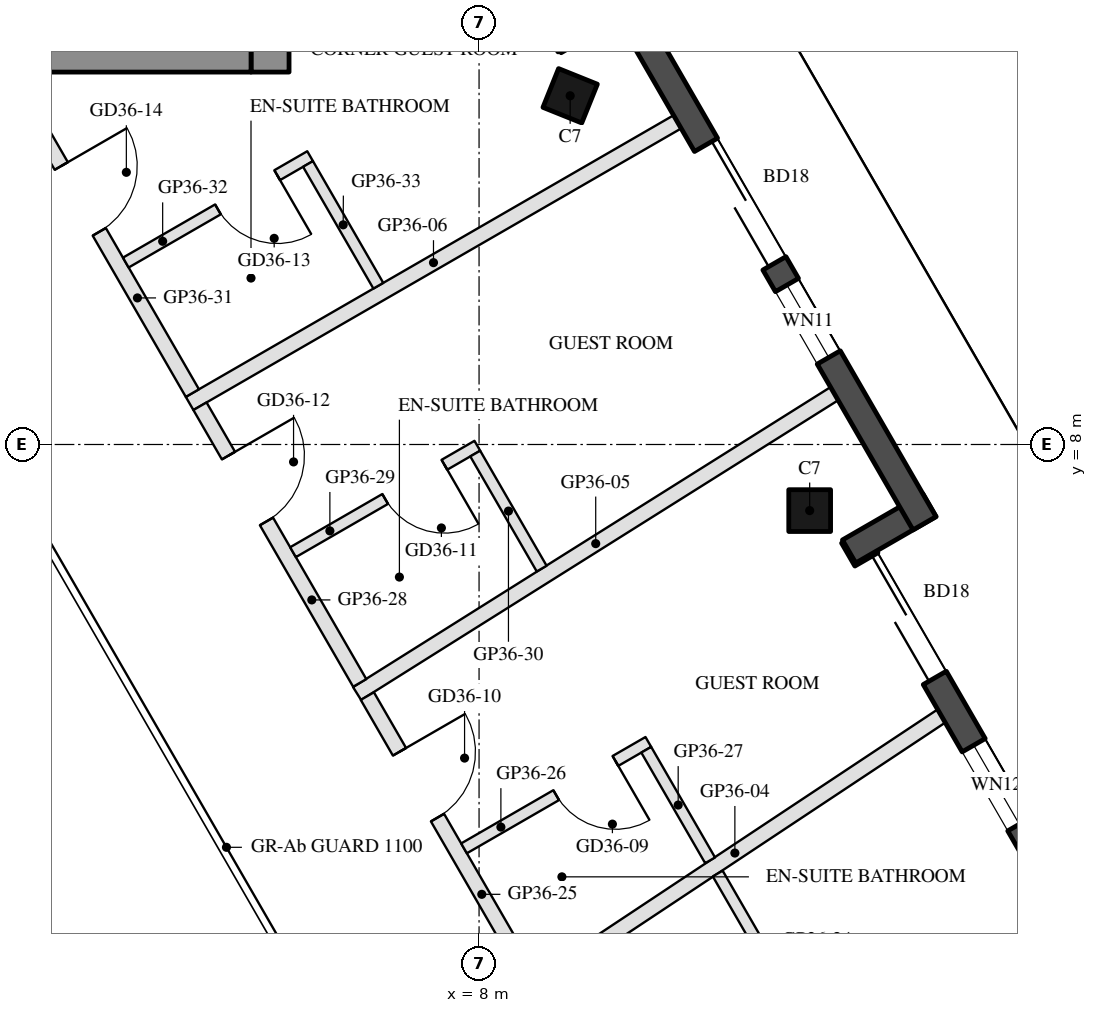
"""IFC4 building model, lengths in metres.
Left out: names, types, materials, properties, quantities, classifications, styles, units other than length and angle.
Written with IfcOpenShell. Run it as: python <this file> out.ifc"""

import sys

from ifc_helpers import new_model, si_unit, direction, frame, frame_2d, origin, origin_2d, place, context, subcontext, project, spatial, rectangle, hollow_rectangle, extrude, boolean, halfspace, element, fill, save


model = new_model("IFC4")
c1 = context("Model", 3, precision=1e-05, world=origin(), true_north=direction((0.0, 1.0)))
c2 = subcontext(c1, "Body", "Model", "MODEL_VIEW")
j1 = project(units=[si_unit("LENGTHUNIT", "METRE"), si_unit("PLANEANGLEUNIT", "RADIAN")], contexts=[c1])
p1 = place(None, origin())
s1 = spatial("IfcSite", under=j1, at=p1, CompositionType="ELEMENT")
p2 = place(p1, origin())
s2 = spatial("IfcBuilding", under=s1, at=p2, CompositionType="ELEMENT")
p3 = place(p2, frame((0.0, 0.0, 328.1)))
s3 = spatial("IfcBuildingStorey", under=s2, at=p3, CompositionType="ELEMENT", Elevation=328.1)
p4 = place(p3, frame((15.501, 1.672, 0.0), z_axis=(-0.161451925123, -0.022915757114, 0.986614485982), x_axis=(0.495072298274, -0.866715969634, 0.060883885081)))
e1 = element("IfcColumn", 1, at=p4, inside=s3, PredefinedType="COLUMN", context=c2, shape_type="SweptSolid", body=[
    boolean("DIFFERENCE", boolean("DIFFERENCE", extrude(hollow_rectangle(XDim=0.55, YDim=0.55, WallThickness=0.025, at=origin_2d()), origin(), (0.0, 0.0, 1.0), 3.75), halfspace(frame((0.0, 0.0, 0.034), z_axis=(0.0, 0.0, 1.0), x_axis=(1.0, 0.0, 0.0)), True)), halfspace(frame((0.0, 0.0, 3.735), z_axis=(0.0, 0.0, 1.0), x_axis=(1.0, 0.0, 0.0)), False)),
])
p5 = place(p3, frame((12.35, 7.13, 0.0), z_axis=(-0.131228839908, -0.075723997581, 0.988455799602), x_axis=(-0.499707328911, 0.866194311446, 1.5866039e-05)))
e2 = element("IfcColumn", 2, at=p5, inside=s3, PredefinedType="COLUMN", context=c2, shape_type="SweptSolid", body=[
    boolean("DIFFERENCE", boolean("DIFFERENCE", extrude(hollow_rectangle(XDim=0.55, YDim=0.55, WallThickness=0.025, at=origin_2d()), origin(), (0.0, 0.0, 1.0), 3.743), halfspace(frame((0.0, 0.0, 0.031), z_axis=(0.0, 0.0, 1.0), x_axis=(1.0, 0.0, 0.0)), True)), halfspace(frame((0.0, 0.0, 3.729), z_axis=(0.0, 0.0, 1.0), x_axis=(1.0, 0.0, 0.0)), False)),
])
p6 = place(p3, frame((9.198, 12.588, 0.0), z_axis=(-0.100518021011, -0.128316722417, 0.98662604172), x_axis=(-0.503129383785, 0.862065632243, 0.060857775822)))
e3 = element("IfcColumn", 3, at=p6, inside=s3, PredefinedType="COLUMN", context=c2, shape_type="SweptSolid", body=[
    boolean("DIFFERENCE", boolean("DIFFERENCE", extrude(hollow_rectangle(XDim=0.55, YDim=0.55, WallThickness=0.025, at=origin_2d()), origin(), (0.0, 0.0, 1.0), 3.75), halfspace(frame((0.0, 0.0, 0.034), z_axis=(0.0, 0.0, 1.0), x_axis=(1.0, 0.0, 0.0)), True)), halfspace(frame((0.0, 0.0, 3.735), z_axis=(0.0, 0.0, 1.0), x_axis=(1.0, 0.0, 0.0)), False)),
])
p7 = place(p3, frame((15.492, 2.337, 0.0), z_axis=(0.0, 0.0, 1.0), x_axis=(-0.499999159329, 0.866025889145, 0.0)))
e4 = element("IfcWall", 4, at=p7, inside=s3, PredefinedType="SOLIDWALL", context=c2, shape_type="SweptSolid", body=[
    extrude(rectangle(XDim=5.143, YDim=0.35, at=frame_2d((2.571, 0.0))), origin(), (0.0, 0.0, 1.0), 3.45),
])
p8 = place(p7, frame((0.77, 0.0, 0.3)))
e5 = element("IfcOpeningElement", 5, at=p8, cuts=e4, PredefinedType="OPENING", context=c2, shape_type="SweptSolid", body=[
    extrude(rectangle(XDim=1.2, YDim=2.65, at=frame_2d((0.6, 1.325))), frame((0.0, 0.185, 0.0), z_axis=(0.0, -1.0, 0.0), x_axis=(1.0, 0.0, 0.0)), (0.0, 0.0, 1.0), 0.37),
])
p9 = place(p7, frame((2.993, 0.0, 0.0)))
e6 = element("IfcOpeningElement", 6, at=p9, cuts=e4, PredefinedType="OPENING", context=c2, shape_type="SweptSolid", body=[
    extrude(rectangle(XDim=1.8, YDim=2.4, at=frame_2d((0.9, 1.2))), frame((0.0, 0.185, 0.0), z_axis=(0.0, -1.0, 0.0), x_axis=(1.0, 0.0, 0.0)), (0.0, 0.0, 1.0), 0.37),
])
p10 = place(p3, frame((12.868, 6.592, 0.0), z_axis=(0.0, 0.0, 1.0), x_axis=(0.866005645448, 0.500034220881, 0.0)))
e7 = element("IfcWall", 7, at=p10, inside=s3, PredefinedType="SOLIDWALL", context=c2, shape_type="SweptSolid", body=[
    extrude(rectangle(XDim=1.22, YDim=0.35, at=frame_2d((0.61, 0.0))), origin(), (0.0, 0.0, 1.0), 3.45),
])
p11 = place(p3, frame((13.861, 6.963, 0.0), z_axis=(0.0, 0.0, 1.0), x_axis=(-0.499985896038, 0.866033546558, 0.0)))
e8 = element("IfcWall", 8, at=p11, inside=s3, PredefinedType="SOLIDWALL", context=c2, shape_type="SweptSolid", body=[
    extrude(rectangle(XDim=8.102, YDim=0.35, at=frame_2d((4.051, 0.0))), origin(), (0.0, 0.0, 1.0), 3.45),
])
p12 = place(p11, frame((3.95, 0.0, 0.0)))
e9 = element("IfcOpeningElement", 9, at=p12, cuts=e8, PredefinedType="OPENING", context=c2, shape_type="SweptSolid", body=[
    extrude(rectangle(XDim=1.8, YDim=2.4, at=frame_2d((0.9, 1.2))), frame((0.0, 0.185, 0.0), z_axis=(0.0, -1.0, 0.0), x_axis=(1.0, 0.0, 0.0)), (0.0, 0.0, 1.0), 0.37),
])
p13 = place(p11, frame((2.52, 0.0, 0.3)))
e10 = element("IfcOpeningElement", 10, at=p13, cuts=e8, PredefinedType="OPENING", context=c2, shape_type="SweptSolid", body=[
    extrude(rectangle(XDim=1.1, YDim=2.65, at=frame_2d((0.55, 1.325))), frame((0.0, 0.185, 0.0), z_axis=(0.0, -1.0, 0.0), x_axis=(1.0, 0.0, 0.0)), (0.0, 0.0, 1.0), 0.37),
])
p14 = place(p3, frame((10.049, 13.916, 0.0), z_axis=(0.0, 0.0, 1.0), x_axis=(-0.866005645448, -0.500034220881, 0.0)))
e11 = element("IfcWall", 11, at=p14, inside=s3, PredefinedType="SOLIDWALL", context=c2, shape_type="SweptSolid", body=[
    extrude(rectangle(XDim=1.22, YDim=0.35, at=frame_2d((0.61, 0.0))), origin(), (0.0, 0.0, 1.0), 3.45),
])
p15 = place(p3, frame((5.25, 12.9, 0.0), z_axis=(0.0, 0.0, 1.0), x_axis=(0.0, 1.0, 0.0)))
e12 = element("IfcWall", 12, at=p15, inside=s3, PredefinedType="SHEAR", context=c2, shape_type="SweptSolid", body=[
    extrude(rectangle(XDim=4.085, YDim=0.5, at=frame_2d((2.042, 0.0))), origin(), (0.0, 0.0, 1.0), 3.45),
])
p16 = place(p3, frame((5.0, 13.1, 0.0), z_axis=(0.0, 0.0, 1.0), x_axis=(-1.0, 0.0, 0.0)))
e13 = element("IfcWall", 13, at=p16, inside=s3, PredefinedType="SHEAR", context=c2, shape_type="SweptSolid", body=[
    extrude(rectangle(XDim=10.0, YDim=0.4, at=frame_2d((5.0, 0.0))), origin(), (0.0, 0.0, 1.0), 3.45),
])
p17 = place(p16, frame((3.55, 0.0, 0.0)))
e14 = element("IfcOpeningElement", 14, at=p17, cuts=e13, PredefinedType="OPENING", context=c2, shape_type="SweptSolid", body=[
    extrude(rectangle(XDim=1.1, YDim=2.1, at=frame_2d((0.55, 1.05))), frame((0.0, 0.21, 0.0), z_axis=(0.0, -1.0, 0.0), x_axis=(1.0, 0.0, 0.0)), (0.0, 0.0, 1.0), 0.42),
])
p18 = place(p16, frame((5.85, 0.0, 0.0)))
e15 = element("IfcOpeningElement", 15, at=p18, cuts=e13, PredefinedType="OPENING", context=c2, shape_type="SweptSolid", body=[
    extrude(rectangle(XDim=1.4, YDim=2.1, at=frame_2d((0.7, 1.05))), frame((0.0, 0.21, 0.0), z_axis=(0.0, -1.0, 0.0), x_axis=(1.0, 0.0, 0.0)), (0.0, 0.0, 1.0), 0.42),
])
p19 = place(p3, frame((14.083, 4.427, 0.0), z_axis=(0.0, 0.0, 1.0), x_axis=(-0.833314888817, -0.55279860354, 0.0)))
e16 = element("IfcWall", 16, at=p19, inside=s3, PredefinedType="PARTITIONING", context=c2, shape_type="SweptSolid", body=[
    extrude(rectangle(XDim=6.523, YDim=0.2, at=frame_2d((3.262, 0.0))), origin(), (0.0, 0.0, 1.0), 2.75),
])
p20 = place(p3, frame((12.674, 8.668, 0.0), z_axis=(0.0, 0.0, 1.0), x_axis=(-0.846714096045, -0.532048155301, 0.0)))
e17 = element("IfcWall", 17, at=p20, inside=s3, PredefinedType="PARTITIONING", context=c2, shape_type="SweptSolid", body=[
    extrude(rectangle(XDim=7.416, YDim=0.2, at=frame_2d((3.708, 0.0))), origin(), (0.0, 0.0, 1.0), 3.05),
])
p21 = place(p3, frame((10.609, 12.245, 0.0), z_axis=(0.0, 0.0, 1.0), x_axis=(-0.866014407023, -0.500019046465, 0.0)))
e18 = element("IfcWall", 18, at=p21, inside=s3, PredefinedType="PARTITIONING", context=c2, shape_type="SweptSolid", body=[
    extrude(rectangle(XDim=7.41, YDim=0.2, at=frame_2d((3.705, 0.0))), origin(), (0.0, 0.0, 1.0), 3.05),
])
p22 = place(p3, frame((12.15, 0.606, 0.0), z_axis=(0.0, 0.0, 1.0), x_axis=(-0.500078207394, 0.865980246016, 0.0)))
e19 = element("IfcWall", 19, at=p22, inside=s3, PredefinedType="PARTITIONING", context=c2, shape_type="SweptSolid", body=[
    extrude(rectangle(XDim=2.02, YDim=0.15, at=frame_2d((1.01, 0.0))), origin(), (0.0, 0.0, 1.0), 3.45),
])
p23 = place(p3, frame((6.53, 4.689, 0.0), z_axis=(0.0, 0.0, 1.0), x_axis=(0.500002449018, -0.866023989838, 0.0)))
e20 = element("IfcWall", 20, at=p23, inside=s3, PredefinedType="PARTITIONING", context=c2, shape_type="SweptSolid", body=[
    extrude(rectangle(XDim=4.302, YDim=0.2, at=frame_2d((2.151, 0.0))), origin(), (0.0, 0.0, 1.0), 2.75),
])
p24 = place(p23, frame((0.846, 0.0, 0.0)))
e21 = element("IfcOpeningElement", 21, at=p24, cuts=e20, PredefinedType="OPENING", context=c2, shape_type="SweptSolid", body=[
    extrude(rectangle(XDim=1.0, YDim=2.1, at=frame_2d((0.5, 1.05))), frame((0.0, 0.11, 0.0), z_axis=(0.0, -1.0, 0.0), x_axis=(1.0, 0.0, 0.0)), (0.0, 0.0, 1.0), 0.22),
])
p25 = place(p3, frame((10.227, 4.086, 0.0), z_axis=(0.0, 0.0, 1.0), x_axis=(-0.866034573852, -0.49998411664, 0.0)))
e22 = element("IfcWall", 22, at=p25, inside=s3, PredefinedType="PARTITIONING", context=c2, shape_type="SweptSolid", body=[
    extrude(rectangle(XDim=2.8, YDim=0.15, at=frame_2d((1.4, 0.0))), origin(), (0.0, 0.0, 1.0), 3.45),
])
p26 = place(p25, frame((0.5, 0.0, 0.0)))
e23 = element("IfcOpeningElement", 23, at=p26, cuts=e22, PredefinedType="OPENING", context=c2, shape_type="SweptSolid", body=[
    extrude(rectangle(XDim=0.9, YDim=2.1, at=frame_2d((0.45, 1.05))), frame((0.0, 0.085, 0.0), z_axis=(0.0, -1.0, 0.0), x_axis=(1.0, 0.0, 0.0)), (0.0, 0.0, 1.0), 0.17),
])
p27 = place(p3, frame((11.04, 2.529, 0.0), z_axis=(0.0, 0.0, 1.0), x_axis=(-0.499999171277, 0.866025882247, 0.0)))
e24 = element("IfcWall", 24, at=p27, inside=s3, PredefinedType="PARTITIONING", context=c2, shape_type="SweptSolid", body=[
    extrude(rectangle(XDim=1.68, YDim=0.15, at=frame_2d((0.84, 0.0))), origin(), (0.0, 0.0, 1.0), 2.75),
])
p28 = place(p3, frame((4.328, 8.503, 0.0), z_axis=(0.0, 0.0, 1.0), x_axis=(0.499980520401, -0.866036650044, 0.0)))
e25 = element("IfcWall", 25, at=p28, inside=s3, PredefinedType="PARTITIONING", context=c2, shape_type="SweptSolid", body=[
    extrude(rectangle(XDim=4.204, YDim=0.2, at=frame_2d((2.102, 0.0))), origin(), (0.0, 0.0, 1.0), 2.75),
])
p29 = place(p28, frame((0.75, 0.0, 0.0)))
e26 = element("IfcOpeningElement", 26, at=p29, cuts=e25, PredefinedType="OPENING", context=c2, shape_type="SweptSolid", body=[
    extrude(rectangle(XDim=1.0, YDim=2.1, at=frame_2d((0.5, 1.05))), frame((0.0, 0.11, 0.0), z_axis=(0.0, -1.0, 0.0), x_axis=(1.0, 0.0, 0.0)), (0.0, 0.0, 1.0), 0.22),
])
p30 = place(p3, frame((7.977, 7.983, 0.0), z_axis=(0.0, 0.0, 1.0), x_axis=(-0.866034573852, -0.49998411664, 0.0)))
e27 = element("IfcWall", 27, at=p30, inside=s3, PredefinedType="PARTITIONING", context=c2, shape_type="SweptSolid", body=[
    extrude(rectangle(XDim=2.8, YDim=0.15, at=frame_2d((1.4, 0.0))), origin(), (0.0, 0.0, 1.0), 2.75),
])
p31 = place(p30, frame((0.5, 0.0, 0.0)))
e28 = element("IfcOpeningElement", 28, at=p31, cuts=e27, PredefinedType="OPENING", context=c2, shape_type="SweptSolid", body=[
    extrude(rectangle(XDim=0.9, YDim=2.1, at=frame_2d((0.45, 1.05))), frame((0.0, 0.085, 0.0), z_axis=(0.0, -1.0, 0.0), x_axis=(1.0, 0.0, 0.0)), (0.0, 0.0, 1.0), 0.17),
])
p32 = place(p3, frame((8.824, 6.367, 0.0), z_axis=(0.0, 0.0, 1.0), x_axis=(-0.500044870432, 0.865999496279, 0.0)))
e29 = element("IfcWall", 29, at=p32, inside=s3, PredefinedType="PARTITIONING", context=c2, shape_type="SweptSolid", body=[
    extrude(rectangle(XDim=1.748, YDim=0.15, at=frame_2d((0.874, 0.0))), origin(), (0.0, 0.0, 1.0), 3.45),
])
p33 = place(p3, frame((1.819, 12.85, 0.0), z_axis=(0.0, 0.0, 1.0), x_axis=(0.500007490527, -0.866021079084, 0.0)))
e30 = element("IfcWall", 30, at=p33, inside=s3, PredefinedType="PARTITIONING", context=c2, shape_type="SweptSolid", body=[
    extrude(rectangle(XDim=4.819, YDim=0.2, at=frame_2d((2.41, 0.0))), origin(), (0.0, 0.0, 1.0), 3.05),
])
p34 = place(p33, frame((1.369, 0.0, 0.0)))
e31 = element("IfcOpeningElement", 31, at=p34, cuts=e30, PredefinedType="OPENING", context=c2, shape_type="SweptSolid", body=[
    extrude(rectangle(XDim=1.0, YDim=2.1, at=frame_2d((0.5, 1.05))), frame((0.0, 0.11, 0.0), z_axis=(0.0, -1.0, 0.0), x_axis=(1.0, 0.0, 0.0)), (0.0, 0.0, 1.0), 0.22),
])
p35 = place(p3, frame((5.777, 11.794, 0.0), z_axis=(0.0, 0.0, 1.0), x_axis=(-0.865996816683, -0.500049511043, 0.0)))
e32 = element("IfcWall", 32, at=p35, inside=s3, PredefinedType="PARTITIONING", context=c2, shape_type="SweptSolid", body=[
    extrude(rectangle(XDim=2.8, YDim=0.15, at=frame_2d((1.4, 0.0))), origin(), (0.0, 0.0, 1.0), 3.45),
])
p36 = place(p35, frame((0.5, 0.0, 0.0)))
e33 = element("IfcOpeningElement", 33, at=p36, cuts=e32, PredefinedType="OPENING", context=c2, shape_type="SweptSolid", body=[
    extrude(rectangle(XDim=0.9, YDim=2.1, at=frame_2d((0.45, 1.05))), frame((0.0, 0.085, 0.0), z_axis=(0.0, -1.0, 0.0), x_axis=(1.0, 0.0, 0.0)), (0.0, 0.0, 1.0), 0.17),
])
p37 = place(p3, frame((6.675, 10.089, 0.0), z_axis=(0.0, 0.0, 1.0), x_axis=(-0.500042316284, 0.866000971088, 0.0)))
e34 = element("IfcWall", 34, at=p37, inside=s3, PredefinedType="PARTITIONING", context=c2, shape_type="SweptSolid", body=[
    extrude(rectangle(XDim=1.85, YDim=0.15, at=frame_2d((0.925, 0.0))), origin(), (0.0, 0.0, 1.0), 3.05),
])
p38 = place(p8, origin())
e35 = element("IfcWindow", 35, at=p38, inside=s3, PartitioningType="SINGLE_PANEL", PredefinedType="WINDOW", context=c2, shape_type="SweptSolid", body=[
    extrude(rectangle(XDim=1.2, YDim=2.65, at=frame_2d((0.6, 1.325))), frame((0.0, 0.03, 0.0), z_axis=(0.0, -1.0, 0.0), x_axis=(1.0, 0.0, 0.0)), (0.0, 0.0, 1.0), 0.06),
])
fill(e5, e35)
p39 = place(p9, frame((1.8, 0.0, 0.0), z_axis=(0.0, 0.0, 1.0), x_axis=(-1.0, 0.0, 0.0)))
e36 = element("IfcDoor", 36, at=p39, inside=s3, OperationType="SLIDING_TO_LEFT", PredefinedType="DOOR", context=c2, shape_type="SweptSolid", body=[
    extrude(rectangle(XDim=1.8, YDim=2.4, at=frame_2d((0.9, 1.2))), frame((0.0, 0.025, 0.0), z_axis=(0.0, -1.0, 0.0), x_axis=(1.0, 0.0, 0.0)), (0.0, 0.0, 1.0), 0.05),
])
fill(e6, e36)
p40 = place(p12, frame((1.8, 0.0, 0.0), z_axis=(0.0, 0.0, 1.0), x_axis=(-1.0, 0.0, 0.0)))
e37 = element("IfcDoor", 37, at=p40, inside=s3, OperationType="SLIDING_TO_LEFT", PredefinedType="DOOR", context=c2, shape_type="SweptSolid", body=[
    extrude(rectangle(XDim=1.8, YDim=2.4, at=frame_2d((0.9, 1.2))), frame((0.0, 0.025, 0.0), z_axis=(0.0, -1.0, 0.0), x_axis=(1.0, 0.0, 0.0)), (0.0, 0.0, 1.0), 0.05),
])
fill(e9, e37)
p41 = place(p13, origin())
e38 = element("IfcWindow", 38, at=p41, inside=s3, PartitioningType="SINGLE_PANEL", PredefinedType="WINDOW", context=c2, shape_type="SweptSolid", body=[
    extrude(rectangle(XDim=1.1, YDim=2.65, at=frame_2d((0.55, 1.325))), frame((0.0, 0.03, 0.0), z_axis=(0.0, -1.0, 0.0), x_axis=(1.0, 0.0, 0.0)), (0.0, 0.0, 1.0), 0.06),
])
fill(e10, e38)
p42 = place(p26, origin())
e39 = element("IfcDoor", 39, at=p42, inside=s3, OperationType="SINGLE_SWING_LEFT", PredefinedType="DOOR", context=c2, shape_type="SweptSolid", body=[
    extrude(rectangle(XDim=0.9, YDim=2.1, at=frame_2d((0.45, 1.05))), frame((0.0, 0.025, 0.0), z_axis=(0.0, -1.0, 0.0), x_axis=(1.0, 0.0, 0.0)), (0.0, 0.0, 1.0), 0.05),
])
fill(e23, e39)
p43 = place(p24, origin())
e40 = element("IfcDoor", 40, at=p43, inside=s3, OperationType="SINGLE_SWING_LEFT", PredefinedType="DOOR", context=c2, shape_type="SweptSolid", body=[
    extrude(rectangle(XDim=1.0, YDim=2.1, at=frame_2d((0.5, 1.05))), frame((0.0, 0.025, 0.0), z_axis=(0.0, -1.0, 0.0), x_axis=(1.0, 0.0, 0.0)), (0.0, 0.0, 1.0), 0.05),
])
fill(e21, e40)
p44 = place(p31, origin())
e41 = element("IfcDoor", 41, at=p44, inside=s3, OperationType="SINGLE_SWING_LEFT", PredefinedType="DOOR", context=c2, shape_type="SweptSolid", body=[
    extrude(rectangle(XDim=0.9, YDim=2.1, at=frame_2d((0.45, 1.05))), frame((0.0, 0.025, 0.0), z_axis=(0.0, -1.0, 0.0), x_axis=(1.0, 0.0, 0.0)), (0.0, 0.0, 1.0), 0.05),
])
fill(e28, e41)
p45 = place(p29, origin())
e42 = element("IfcDoor", 42, at=p45, inside=s3, OperationType="SINGLE_SWING_LEFT", PredefinedType="DOOR", context=c2, shape_type="SweptSolid", body=[
    extrude(rectangle(XDim=1.0, YDim=2.1, at=frame_2d((0.5, 1.05))), frame((0.0, 0.025, 0.0), z_axis=(0.0, -1.0, 0.0), x_axis=(1.0, 0.0, 0.0)), (0.0, 0.0, 1.0), 0.05),
])
fill(e26, e42)
p46 = place(p36, origin())
e43 = element("IfcDoor", 43, at=p46, inside=s3, OperationType="SINGLE_SWING_LEFT", PredefinedType="DOOR", context=c2, shape_type="SweptSolid", body=[
    extrude(rectangle(XDim=0.9, YDim=2.1, at=frame_2d((0.45, 1.05))), frame((0.0, 0.025, 0.0), z_axis=(0.0, -1.0, 0.0), x_axis=(1.0, 0.0, 0.0)), (0.0, 0.0, 1.0), 0.05),
])
fill(e33, e43)
p47 = place(p34, origin())
e44 = element("IfcDoor", 44, at=p47, inside=s3, OperationType="SINGLE_SWING_LEFT", PredefinedType="DOOR", context=c2, shape_type="SweptSolid", body=[
    extrude(rectangle(XDim=1.0, YDim=2.1, at=frame_2d((0.5, 1.05))), frame((0.0, 0.025, 0.0), z_axis=(0.0, -1.0, 0.0), x_axis=(1.0, 0.0, 0.0)), (0.0, 0.0, 1.0), 0.05),
])
fill(e31, e44)
save(model, sys.argv[1])
